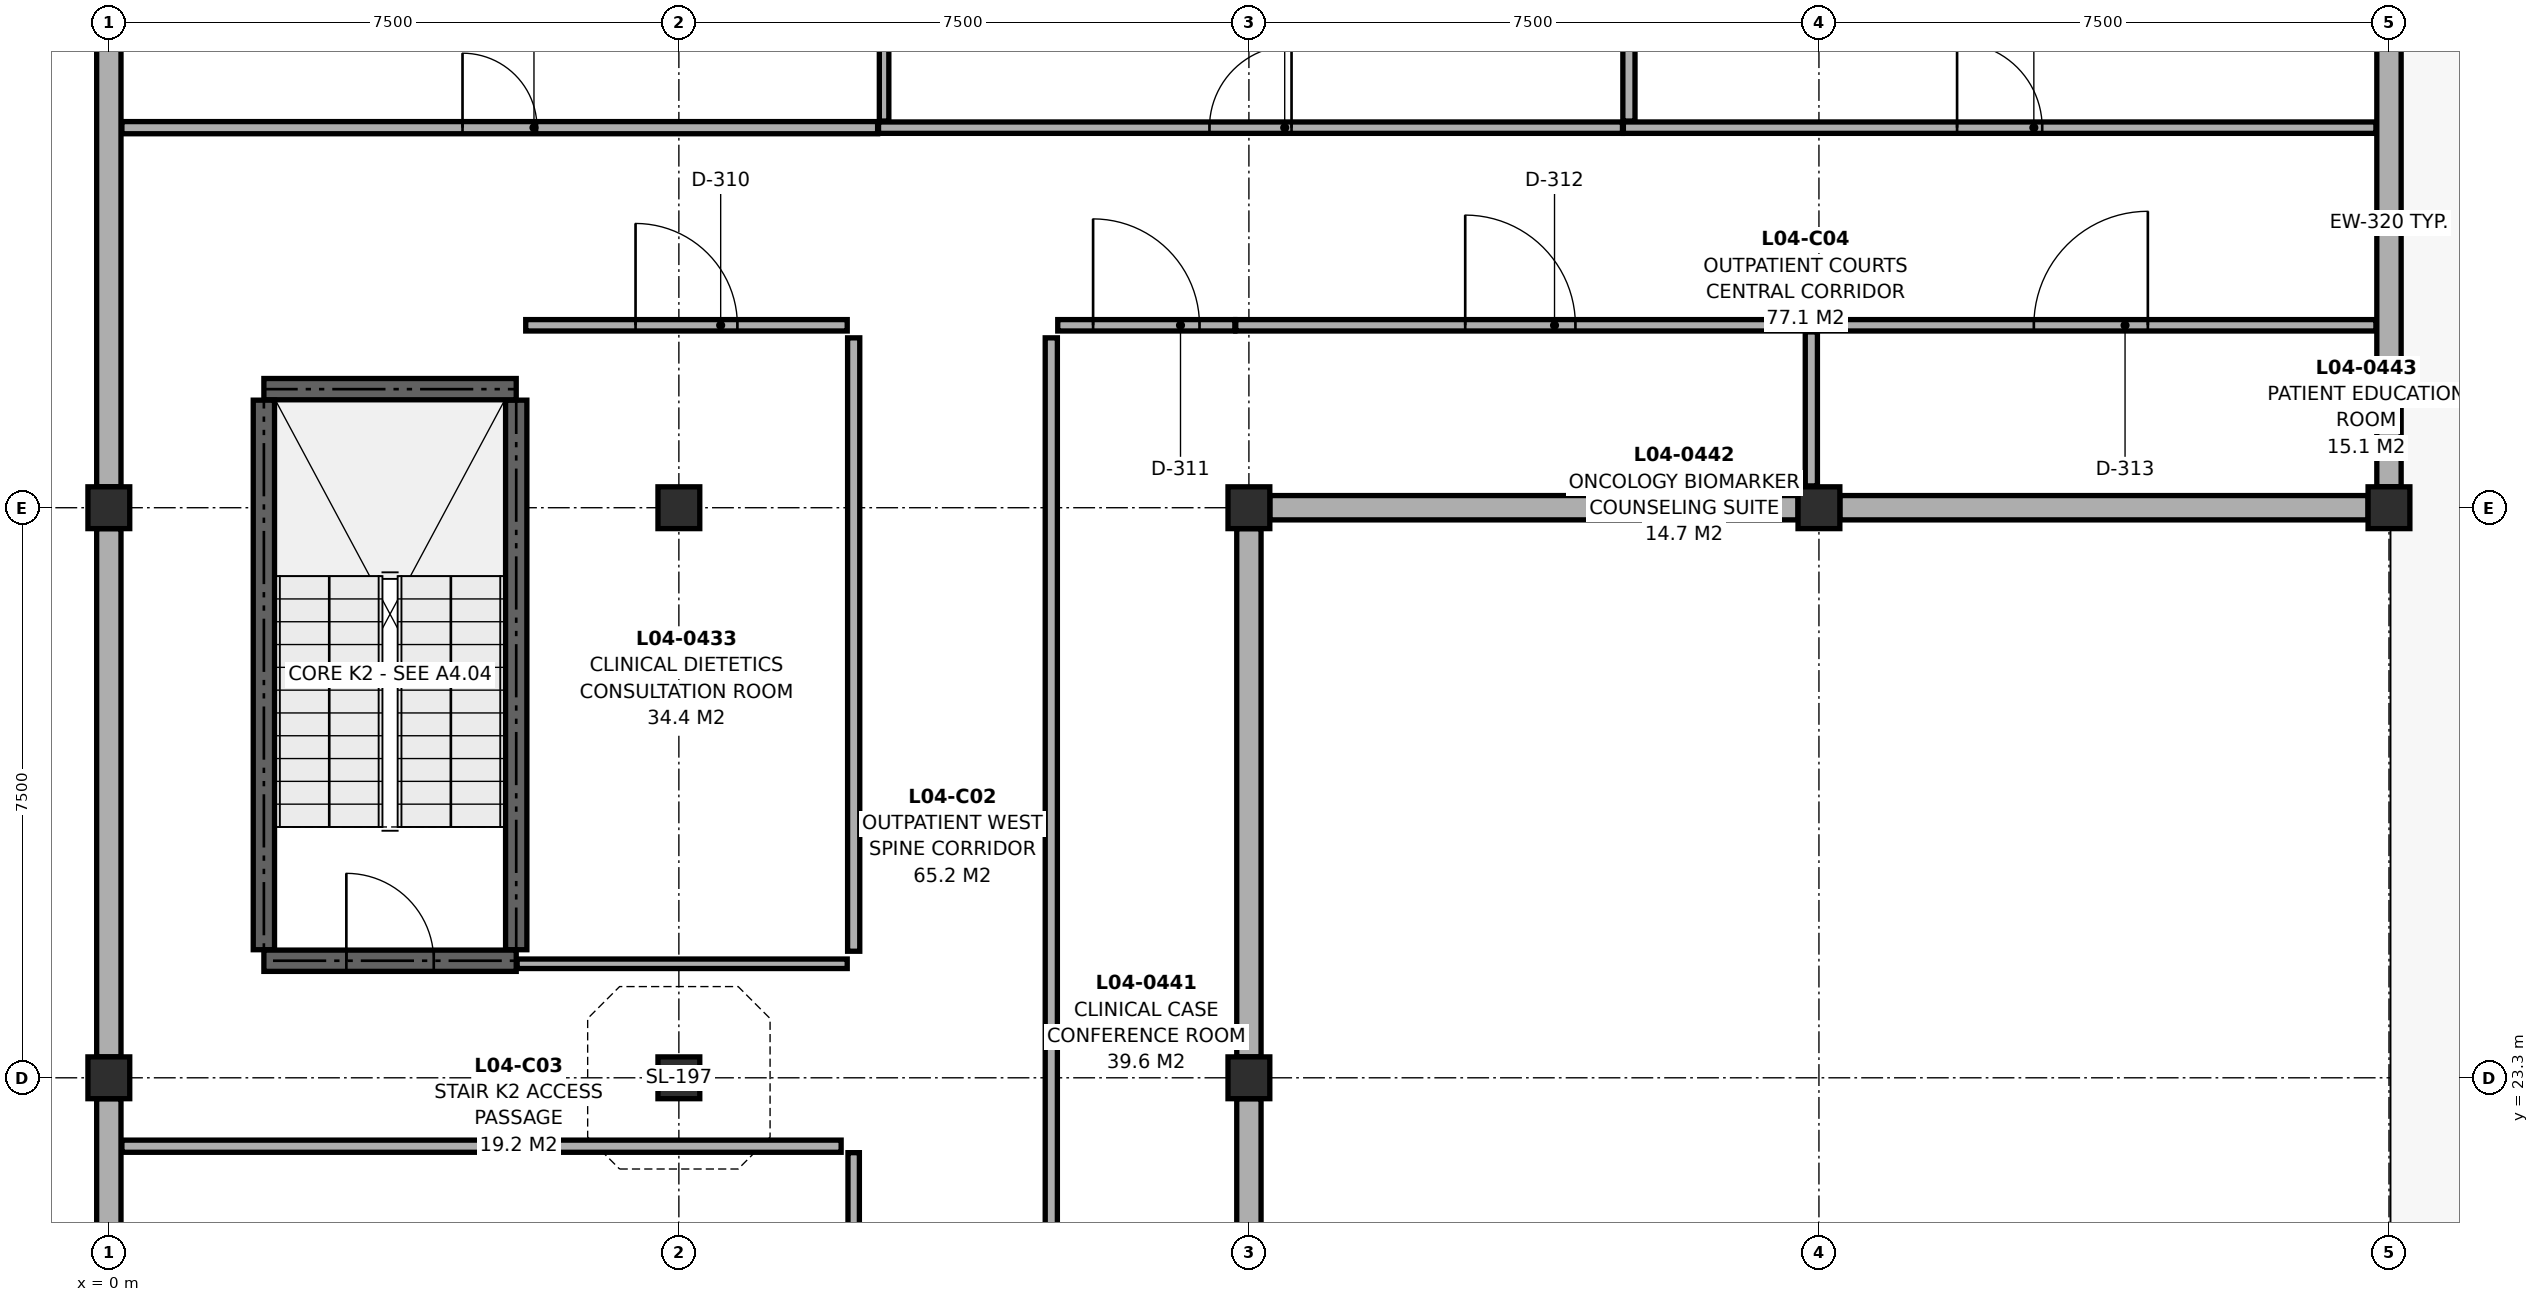
"""IFC4 building model, lengths in metres.
Left out: names, types, materials, properties, quantities, classifications, styles, units other than length and angle.
Written with IfcOpenShell. Run it as: python <this file> out.ifc"""

import sys

from ifc_helpers import new_model, si_unit, direction, frame, frame_2d, origin, origin_2d, place, context, subcontext, project, spatial, rectangle, extrude, element, fill, save


model = new_model("IFC4")
c1 = context("Model", 3, precision=1e-05, world=origin(), true_north=direction((0.0, 1.0)))
c2 = subcontext(c1, "Body", "Model", "MODEL_VIEW")
j1 = project(units=[si_unit("LENGTHUNIT", "METRE"), si_unit("PLANEANGLEUNIT", "RADIAN")], contexts=[c1])
p1 = place(None, origin())
s1 = spatial("IfcSite", under=j1, at=p1, CompositionType="ELEMENT")
p2 = place(p1, origin())
s2 = spatial("IfcBuilding", under=s1, at=p2, CompositionType="ELEMENT")
p3 = place(p2, frame((0.0, 0.0, 17.5)))
s3 = spatial("IfcBuildingStorey", under=s2, at=p3, CompositionType="ELEMENT", Elevation=17.5)
for number, where, z_axis, x_axis in (
    (1, (0.0, 23.3, 0.0), (0.0, 0.0, 1.0), (1.0, 0.0, 0.0)),
    (2, (0.0, 30.8, 0.0), (0.0, 0.0, 1.0), (1.0, 0.0, 0.0)),
    (3, (7.5, 23.3, 0.0), (0.0, 0.0, 1.0), (1.0, 0.0, 0.0)),
    (4, (7.5, 30.8, 0.0), (0.0, 0.0, 1.0), (1.0, 0.0, 0.0)),
    (5, (15.0, 23.3, 0.0), (0.0, 0.0, 1.0), (1.0, 0.0, 0.0)),
    (6, (15.0, 30.8, 0.0), (0.0, 0.0, 1.0), (1.0, 0.0, 0.0)),
):
    element("IfcColumn", number, at=place(p3, frame(where, z_axis=z_axis, x_axis=x_axis)), inside=s3, PredefinedType="COLUMN", context=c2, shape_type="SweptSolid", body=[
        extrude(rectangle(XDim=0.55, YDim=0.55, at=origin_2d()), origin(), (0.0, 0.0, 1.0), 3.72),
    ])
for number, where, z_axis, x_axis in (
    (7, (22.5, 30.8, 0.0), (0.0, 0.0, 1.0), (1.0, 0.0, 0.0)),
    (8, (30.0, 30.8, 0.0), (0.0, 0.0, 1.0), (1.0, 0.0, 0.0)),
):
    element("IfcColumn", number, at=place(p3, frame(where, z_axis=z_axis, x_axis=x_axis)), inside=s3, PredefinedType="COLUMN", context=c2, shape_type="SweptSolid", body=[
        extrude(rectangle(XDim=0.55, YDim=0.55, at=origin_2d()), origin(), (0.0, 0.0, 1.0), 3.75),
    ])
p4 = place(p3, frame((30.0, 38.025, 0.0), z_axis=(0.0, 0.0, 1.0), x_axis=(0.0, -1.0, 0.0)))
e9 = element("IfcWall", 9, at=p4, inside=s3, PredefinedType="SOLIDWALL", context=c2, shape_type="SweptSolid", body=[
    extrude(rectangle(XDim=6.95, YDim=0.32, at=frame_2d((3.475, 0.0))), origin(), (0.0, 0.0, 1.0), 3.085),
])
p5 = place(p3, frame((29.725, 30.8, 0.0), z_axis=(0.0, 0.0, 1.0), x_axis=(-1.0, 0.0, 0.0)))
e10 = element("IfcWall", 10, at=p5, inside=s3, PredefinedType="SOLIDWALL", context=c2, shape_type="SweptSolid", body=[
    extrude(rectangle(XDim=6.95, YDim=0.32, at=frame_2d((3.475, 0.0))), origin(), (0.0, 0.0, 1.0), 3.035),
])
p6 = place(p3, frame((22.225, 30.8, 0.0), z_axis=(0.0, 0.0, 1.0), x_axis=(-1.0, 0.0, 0.0)))
e11 = element("IfcWall", 11, at=p6, inside=s3, PredefinedType="SOLIDWALL", context=c2, shape_type="SweptSolid", body=[
    extrude(rectangle(XDim=6.95, YDim=0.32, at=frame_2d((3.475, 0.0))), origin(), (0.0, 0.0, 1.0), 3.005),
])
for number, where, z_axis, x_axis in (
    (12, (15.0, 30.525, 0.0), (0.0, 0.0, 1.0), (0.0, -1.0, 0.0)),
    (13, (15.0, 23.025, 0.0), (0.0, 0.0, 1.0), (0.0, -1.0, 0.0)),
    (14, (0.0, 16.075, 0.0), (0.0, 0.0, 1.0), (0.0, 1.0, 0.0)),
    (15, (0.0, 23.575, 0.0), (0.0, 0.0, 1.0), (0.0, 1.0, 0.0)),
):
    element("IfcWall", number, at=place(p3, frame(where, z_axis=z_axis, x_axis=x_axis)), inside=s3, PredefinedType="SOLIDWALL", context=c2, shape_type="SweptSolid", body=[
        extrude(rectangle(XDim=6.95, YDim=0.32, at=frame_2d((3.475, 0.0))), origin(), (0.0, 0.0, 1.0), 2.805),
    ])
p7 = place(p3, frame((0.0, 31.075, 0.0), z_axis=(0.0, 0.0, 1.0), x_axis=(0.0, 1.0, 0.0)))
e16 = element("IfcWall", 16, at=p7, inside=s3, PredefinedType="SOLIDWALL", context=c2, shape_type="SweptSolid", body=[
    extrude(rectangle(XDim=6.95, YDim=0.32, at=frame_2d((3.475, 0.0))), origin(), (0.0, 0.0, 1.0), 3.055),
])
p8 = place(p3, frame((5.36, 24.985, 0.0), z_axis=(0.0, 0.0, 1.0), x_axis=(0.0, 1.0, 0.0)))
e17 = element("IfcWall", 17, at=p8, inside=s3, PredefinedType="SHEAR", context=c2, shape_type="SweptSolid", body=[
    extrude(rectangle(XDim=7.23, YDim=0.28, at=frame_2d((3.615, 0.0))), origin(), (0.0, 0.0, 1.0), 3.72),
])
p9 = place(p3, frame((5.36, 32.36, 0.0), z_axis=(0.0, 0.0, 1.0), x_axis=(-1.0, 0.0, 0.0)))
e18 = element("IfcWall", 18, at=p9, inside=s3, PredefinedType="SHEAR", context=c2, shape_type="SweptSolid", body=[
    extrude(rectangle(XDim=3.32, YDim=0.28, at=frame_2d((1.66, 0.0))), origin(), (0.0, 0.0, 1.0), 3.72),
])
p10 = place(p3, frame((2.04, 32.215, 0.0), z_axis=(0.0, 0.0, 1.0), x_axis=(0.0, -1.0, 0.0)))
e19 = element("IfcWall", 19, at=p10, inside=s3, PredefinedType="SHEAR", context=c2, shape_type="SweptSolid", body=[
    extrude(rectangle(XDim=7.23, YDim=0.28, at=frame_2d((3.615, 0.0))), origin(), (0.0, 0.0, 1.0), 3.72),
])
p11 = place(p3, frame((2.04, 24.84, 0.0), z_axis=(0.0, 0.0, 1.0), x_axis=(1.0, 0.0, 0.0)))
e20 = element("IfcWall", 20, at=p11, inside=s3, PredefinedType="SHEAR", context=c2, shape_type="SweptSolid", body=[
    extrude(rectangle(XDim=3.32, YDim=0.28, at=frame_2d((1.66, 0.0))), origin(), (0.0, 0.0, 1.0), 3.72),
])
p12 = place(p11, frame((1.085, 0.0, 0.0)))
e21 = element("IfcOpeningElement", 21, at=p12, cuts=e20, PredefinedType="OPENING", context=c2, shape_type="SweptSolid", body=[
    extrude(rectangle(XDim=1.15, YDim=2.15, at=frame_2d((0.575, 1.075))), frame((0.0, 0.152, 0.0), z_axis=(0.0, -1.0, 0.0), x_axis=(1.0, 0.0, 0.0)), (0.0, 0.0, 1.0), 0.304),
])
p13 = place(p3, frame((0.172, 35.8, 0.0), z_axis=(0.0, 0.0, 1.0), x_axis=(1.0, 0.0, 0.0)))
e22 = element("IfcWall", 22, at=p13, inside=s3, PredefinedType="PARTITIONING", context=c2, shape_type="SweptSolid", body=[
    extrude(rectangle(XDim=9.943, YDim=0.16, at=frame_2d((4.971, 0.0))), origin(), (0.0, 0.0, 1.0), 3.005),
])
p14 = place(p13, frame((4.481, 0.0, 0.0)))
e23 = element("IfcOpeningElement", 23, at=p14, cuts=e22, PredefinedType="OPENING", context=c2, shape_type="SweptSolid", body=[
    extrude(rectangle(XDim=0.98, YDim=2.12, at=frame_2d((0.49, 1.06))), frame((0.0, 0.092, 0.0), z_axis=(0.0, -1.0, 0.0), x_axis=(1.0, 0.0, 0.0)), (0.0, 0.0, 1.0), 0.184),
])
p15 = place(p3, frame((10.127, 35.8, 0.0), z_axis=(0.0, 0.0, 1.0), x_axis=(1.0, 0.0, 0.0)))
e24 = element("IfcWall", 24, at=p15, inside=s3, PredefinedType="PARTITIONING", context=c2, shape_type="SweptSolid", body=[
    extrude(rectangle(XDim=9.788, YDim=0.15, at=frame_2d((4.894, 0.0))), origin(), (0.0, 0.0, 1.0), 3.005),
])
p16 = place(p15, frame((4.354, 0.0, 0.0)))
e25 = element("IfcOpeningElement", 25, at=p16, cuts=e24, PredefinedType="OPENING", context=c2, shape_type="SweptSolid", body=[
    extrude(rectangle(XDim=1.08, YDim=2.18, at=frame_2d((0.54, 1.09))), frame((0.0, 0.087, 0.0), z_axis=(0.0, -1.0, 0.0), x_axis=(1.0, 0.0, 0.0)), (0.0, 0.0, 1.0), 0.174),
])
p17 = place(p3, frame((19.927, 35.8, 0.0), z_axis=(0.0, 0.0, 1.0), x_axis=(1.0, 0.0, 0.0)))
e26 = element("IfcWall", 26, at=p17, inside=s3, PredefinedType="PARTITIONING", context=c2, shape_type="SweptSolid", body=[
    extrude(rectangle(XDim=9.901, YDim=0.15, at=frame_2d((4.95, 0.0))), origin(), (0.0, 0.0, 1.0), 3.035),
])
p18 = place(p17, frame((4.39, 0.0, 0.0)))
e27 = element("IfcOpeningElement", 27, at=p18, cuts=e26, PredefinedType="OPENING", context=c2, shape_type="SweptSolid", body=[
    extrude(rectangle(XDim=1.12, YDim=2.2, at=frame_2d((0.56, 1.1))), frame((0.0, 0.087, 0.0), z_axis=(0.0, -1.0, 0.0), x_axis=(1.0, 0.0, 0.0)), (0.0, 0.0, 1.0), 0.174),
])
p19 = place(p3, frame((9.8, 15.127, 0.0), z_axis=(0.0, 0.0, 1.0), x_axis=(0.0, 1.0, 0.0)))
e28 = element("IfcWall", 28, at=p19, inside=s3, PredefinedType="PARTITIONING", context=c2, shape_type="SweptSolid", body=[
    extrude(rectangle(XDim=7.188, YDim=0.15, at=frame_2d((3.594, 0.0))), origin(), (0.0, 0.0, 1.0), 2.805),
])
p20 = place(p19, frame((2.954, 0.0, 0.0)))
e29 = element("IfcOpeningElement", 29, at=p20, cuts=e28, PredefinedType="OPENING", context=c2, shape_type="SweptSolid", body=[
    extrude(rectangle(XDim=1.28, YDim=2.22, at=frame_2d((0.64, 1.11))), frame((0.0, 0.087, 0.0), z_axis=(0.0, -1.0, 0.0), x_axis=(1.0, 0.0, 0.0)), (0.0, 0.0, 1.0), 0.174),
])
p21 = place(p3, frame((5.485, 33.2, 0.0), z_axis=(0.0, 0.0, 1.0), x_axis=(1.0, 0.0, 0.0)))
e30 = element("IfcWall", 30, at=p21, inside=s3, PredefinedType="PARTITIONING", context=c2, shape_type="SweptSolid", body=[
    extrude(rectangle(XDim=4.23, YDim=0.15, at=frame_2d((2.115, 0.0))), origin(), (0.0, 0.0, 1.0), 3.005),
])
p22 = place(p21, frame((1.445, 0.0, 0.0)))
e31 = element("IfcOpeningElement", 31, at=p22, cuts=e30, PredefinedType="OPENING", context=c2, shape_type="SweptSolid", body=[
    extrude(rectangle(XDim=1.34, YDim=2.24, at=frame_2d((0.67, 1.12))), frame((0.0, 0.087, 0.0), z_axis=(0.0, -1.0, 0.0), x_axis=(1.0, 0.0, 0.0)), (0.0, 0.0, 1.0), 0.174),
])
p23 = place(p3, frame((12.485, 33.2, 0.0), z_axis=(0.0, 0.0, 1.0), x_axis=(1.0, 0.0, 0.0)))
e32 = element("IfcWall", 32, at=p23, inside=s3, PredefinedType="PARTITIONING", context=c2, shape_type="SweptSolid", body=[
    extrude(rectangle(XDim=2.33, YDim=0.15, at=frame_2d((1.165, 0.0))), origin(), (0.0, 0.0, 1.0), 3.005),
])
p24 = place(p23, frame((0.465, 0.0, 0.0)))
e33 = element("IfcOpeningElement", 33, at=p24, cuts=e32, PredefinedType="OPENING", context=c2, shape_type="SweptSolid", body=[
    extrude(rectangle(XDim=1.4, YDim=2.25, at=frame_2d((0.7, 1.125))), frame((0.0, 0.087, 0.0), z_axis=(0.0, -1.0, 0.0), x_axis=(1.0, 0.0, 0.0)), (0.0, 0.0, 1.0), 0.174),
])
p25 = place(p3, frame((14.827, 33.2, 0.0), z_axis=(0.0, 0.0, 1.0), x_axis=(1.0, 0.0, 0.0)))
e34 = element("IfcWall", 34, at=p25, inside=s3, PredefinedType="PARTITIONING", context=c2, shape_type="SweptSolid", body=[
    extrude(rectangle(XDim=7.488, YDim=0.15, at=frame_2d((3.744, 0.0))), origin(), (0.0, 0.0, 1.0), 3.005),
])
p26 = place(p25, frame((3.019, 0.0, 0.0)))
e35 = element("IfcOpeningElement", 35, at=p26, cuts=e34, PredefinedType="OPENING", context=c2, shape_type="SweptSolid", body=[
    extrude(rectangle(XDim=1.45, YDim=2.26, at=frame_2d((0.725, 1.13))), frame((0.0, 0.087, 0.0), z_axis=(0.0, -1.0, 0.0), x_axis=(1.0, 0.0, 0.0)), (0.0, 0.0, 1.0), 0.174),
])
p27 = place(p3, frame((22.327, 33.2, 0.0), z_axis=(0.0, 0.0, 1.0), x_axis=(1.0, 0.0, 0.0)))
e36 = element("IfcWall", 36, at=p27, inside=s3, PredefinedType="PARTITIONING", context=c2, shape_type="SweptSolid", body=[
    extrude(rectangle(XDim=7.501, YDim=0.15, at=frame_2d((3.75, 0.0))), origin(), (0.0, 0.0, 1.0), 3.035),
])
p28 = place(p27, frame((3.0, 0.0, 0.0)))
e37 = element("IfcOpeningElement", 37, at=p28, cuts=e36, PredefinedType="OPENING", context=c2, shape_type="SweptSolid", body=[
    extrude(rectangle(XDim=1.5, YDim=2.28, at=frame_2d((0.75, 1.14))), frame((0.0, 0.087, 0.0), z_axis=(0.0, -1.0, 0.0), x_axis=(1.0, 0.0, 0.0)), (0.0, 0.0, 1.0), 0.174),
])
p29 = place(p3, frame((5.372, 24.8, 0.0), z_axis=(0.0, 0.0, 1.0), x_axis=(1.0, 0.0, 0.0)))
e38 = element("IfcWall", 38, at=p29, inside=s3, PredefinedType="PARTITIONING", context=c2, shape_type="SweptSolid", body=[
    extrude(rectangle(XDim=4.343, YDim=0.125, at=frame_2d((2.171, 0.0))), origin(), (0.0, 0.0, 1.0), 2.805),
])
p30 = place(p3, frame((10.2, 35.887, 0.0), z_axis=(0.0, 0.0, 1.0), x_axis=(0.0, 1.0, 0.0)))
e39 = element("IfcWall", 39, at=p30, inside=s3, PredefinedType="PARTITIONING", context=c2, shape_type="SweptSolid", body=[
    extrude(rectangle(XDim=9.741, YDim=0.125, at=frame_2d((4.871, 0.0))), origin(), (0.0, 0.0, 1.0), 3.055),
])
p31 = place(p3, frame((20.0, 35.887, 0.0), z_axis=(0.0, 0.0, 1.0), x_axis=(0.0, 1.0, 0.0)))
e40 = element("IfcWall", 40, at=p31, inside=s3, PredefinedType="PARTITIONING", context=c2, shape_type="SweptSolid", body=[
    extrude(rectangle(XDim=9.741, YDim=0.16, at=frame_2d((4.871, 0.0))), origin(), (0.0, 0.0, 1.0), 3.055),
])
p32 = place(p3, frame((0.172, 22.4, 0.0), z_axis=(0.0, 0.0, 1.0), x_axis=(1.0, 0.0, 0.0)))
e41 = element("IfcWall", 41, at=p32, inside=s3, PredefinedType="PARTITIONING", context=c2, shape_type="SweptSolid", body=[
    extrude(rectangle(XDim=9.463, YDim=0.16, at=frame_2d((4.731, 0.0))), origin(), (0.0, 0.0, 1.0), 2.805),
])
p33 = place(p3, frame((9.8, 24.965, 0.0), z_axis=(0.0, 0.0, 1.0), x_axis=(0.0, 1.0, 0.0)))
e42 = element("IfcWall", 42, at=p33, inside=s3, PredefinedType="PARTITIONING", context=c2, shape_type="SweptSolid", body=[
    extrude(rectangle(XDim=8.07, YDim=0.16, at=frame_2d((4.035, 0.0))), origin(), (0.0, 0.0, 1.0), 3.005),
])
p34 = place(p3, frame((12.4, 15.965, 0.0), z_axis=(0.0, 0.0, 1.0), x_axis=(0.0, 1.0, 0.0)))
e43 = element("IfcWall", 43, at=p34, inside=s3, PredefinedType="PARTITIONING", context=c2, shape_type="SweptSolid", body=[
    extrude(rectangle(XDim=17.07, YDim=0.16, at=frame_2d((8.535, 0.0))), origin(), (0.0, 0.0, 1.0), 2.805),
])
p35 = place(p3, frame((22.4, 31.087, 0.0), z_axis=(0.0, 0.0, 1.0), x_axis=(0.0, 1.0, 0.0)))
e44 = element("IfcWall", 44, at=p35, inside=s3, PredefinedType="PARTITIONING", context=c2, shape_type="SweptSolid", body=[
    extrude(rectangle(XDim=2.026, YDim=0.16, at=frame_2d((1.013, 0.0))), origin(), (0.0, 0.0, 1.0), 3.035),
])
p36 = place(p12, origin())
e45 = element("IfcDoor", 45, at=p36, inside=s3, OperationType="SINGLE_SWING_LEFT", PredefinedType="DOOR", context=c2, shape_type="SweptSolid", body=[
    extrude(rectangle(XDim=1.15, YDim=2.15, at=frame_2d((0.575, 1.075))), frame((0.0, 0.025, 0.0), z_axis=(0.0, -1.0, 0.0), x_axis=(1.0, 0.0, 0.0)), (0.0, 0.0, 1.0), 0.05),
])
fill(e21, e45)
p37 = place(p14, origin())
e46 = element("IfcDoor", 46, at=p37, inside=s3, OperationType="SINGLE_SWING_LEFT", PredefinedType="DOOR", context=c2, shape_type="SweptSolid", body=[
    extrude(rectangle(XDim=0.98, YDim=2.12, at=frame_2d((0.49, 1.06))), frame((0.0, 0.025, 0.0), z_axis=(0.0, -1.0, 0.0), x_axis=(1.0, 0.0, 0.0)), (0.0, 0.0, 1.0), 0.05),
])
fill(e23, e46)
p38 = place(p16, origin())
e47 = element("IfcDoor", 47, at=p38, inside=s3, OperationType="SINGLE_SWING_RIGHT", PredefinedType="DOOR", context=c2, shape_type="SweptSolid", body=[
    extrude(rectangle(XDim=1.08, YDim=2.18, at=frame_2d((0.54, 1.09))), frame((0.0, 0.025, 0.0), z_axis=(0.0, -1.0, 0.0), x_axis=(1.0, 0.0, 0.0)), (0.0, 0.0, 1.0), 0.05),
])
fill(e25, e47)
p39 = place(p18, origin())
e48 = element("IfcDoor", 48, at=p39, inside=s3, OperationType="SINGLE_SWING_LEFT", PredefinedType="DOOR", context=c2, shape_type="SweptSolid", body=[
    extrude(rectangle(XDim=1.12, YDim=2.2, at=frame_2d((0.56, 1.1))), frame((0.0, 0.025, 0.0), z_axis=(0.0, -1.0, 0.0), x_axis=(1.0, 0.0, 0.0)), (0.0, 0.0, 1.0), 0.05),
])
fill(e27, e48)
p40 = place(p22, origin())
e49 = element("IfcDoor", 49, at=p40, inside=s3, OperationType="SINGLE_SWING_LEFT", PredefinedType="DOOR", context=c2, shape_type="SweptSolid", body=[
    extrude(rectangle(XDim=1.34, YDim=2.24, at=frame_2d((0.67, 1.12))), frame((0.0, 0.025, 0.0), z_axis=(0.0, -1.0, 0.0), x_axis=(1.0, 0.0, 0.0)), (0.0, 0.0, 1.0), 0.05),
])
fill(e31, e49)
p41 = place(p24, origin())
e50 = element("IfcDoor", 50, at=p41, inside=s3, OperationType="SINGLE_SWING_LEFT", PredefinedType="DOOR", context=c2, shape_type="SweptSolid", body=[
    extrude(rectangle(XDim=1.4, YDim=2.25, at=frame_2d((0.7, 1.125))), frame((0.0, 0.025, 0.0), z_axis=(0.0, -1.0, 0.0), x_axis=(1.0, 0.0, 0.0)), (0.0, 0.0, 1.0), 0.05),
])
fill(e33, e50)
p42 = place(p26, origin())
e51 = element("IfcDoor", 51, at=p42, inside=s3, OperationType="SINGLE_SWING_LEFT", PredefinedType="DOOR", context=c2, shape_type="SweptSolid", body=[
    extrude(rectangle(XDim=1.45, YDim=2.26, at=frame_2d((0.725, 1.13))), frame((0.0, 0.025, 0.0), z_axis=(0.0, -1.0, 0.0), x_axis=(1.0, 0.0, 0.0)), (0.0, 0.0, 1.0), 0.05),
])
fill(e35, e51)
p43 = place(p28, origin())
e52 = element("IfcDoor", 52, at=p43, inside=s3, OperationType="SINGLE_SWING_RIGHT", PredefinedType="DOOR", context=c2, shape_type="SweptSolid", body=[
    extrude(rectangle(XDim=1.5, YDim=2.28, at=frame_2d((0.75, 1.14))), frame((0.0, 0.025, 0.0), z_axis=(0.0, -1.0, 0.0), x_axis=(1.0, 0.0, 0.0)), (0.0, 0.0, 1.0), 0.05),
])
fill(e37, e52)
save(model, sys.argv[1])
